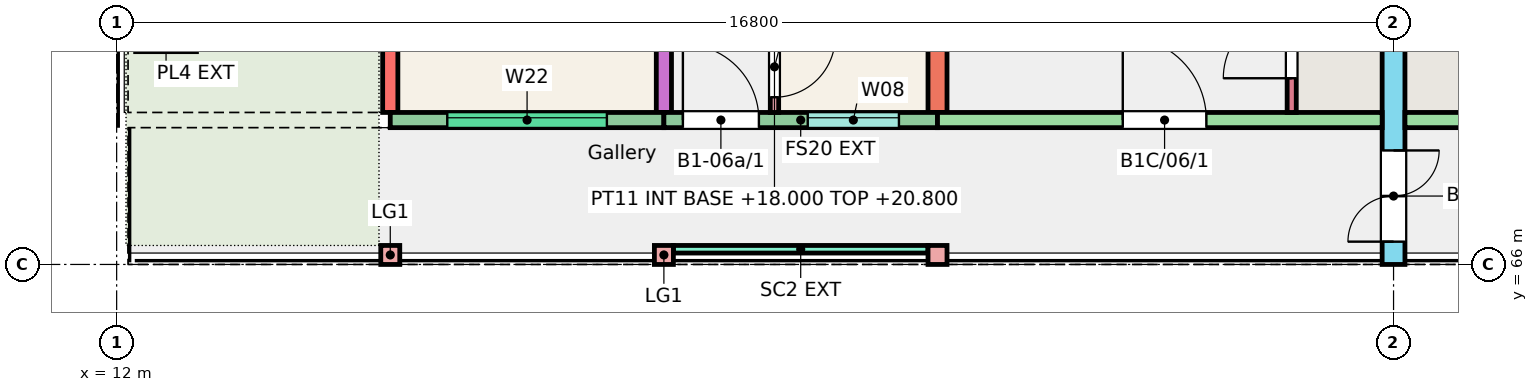
"""IFC4 building model, lengths in metres.
Left out: names, types, materials, properties, quantities, classifications, styles, units other than length and angle.
Written with IfcOpenShell. Run it as: python <this file> out.ifc"""

import sys

from ifc_helpers import new_model, si_unit, direction, frame, frame_2d, origin, origin_2d, place, context, subcontext, project, spatial, rectangle, extrude, element, fill, save


model = new_model("IFC4")
c1 = context("Model", 3, precision=1e-05, world=origin(), true_north=direction((0.0, 1.0)))
c2 = subcontext(c1, "Body", "Model", "MODEL_VIEW")
j1 = project(units=[si_unit("LENGTHUNIT", "METRE"), si_unit("PLANEANGLEUNIT", "RADIAN")], contexts=[c1])
p1 = place(None, origin())
s1 = spatial("IfcSite", under=j1, at=p1, CompositionType="ELEMENT")
p2 = place(p1, origin())
s2 = spatial("IfcBuilding", under=s1, at=p2, CompositionType="ELEMENT")
p3 = place(p2, frame((0.0, 0.0, 18.0)))
s3 = spatial("IfcBuildingStorey", under=s2, at=p3, CompositionType="ELEMENT", Elevation=18.0)
p4 = place(p3, frame((15.6, 68.0, 0.0), z_axis=(0.0, 0.0, 1.0), x_axis=(0.0, 1.0, 0.0)))
e1 = element("IfcWall", 1, at=p4, inside=s3, PredefinedType="SHEAR", context=c2, shape_type="SweptSolid", body=[
    extrude(rectangle(XDim=9.0, YDim=0.2, at=frame_2d((4.5, 0.0))), origin(), (0.0, 0.0, 1.0), 3.0),
])
p5 = place(p4, frame((1.45, 0.0, 0.9)))
e2 = element("IfcOpeningElement", 2, at=p5, cuts=e1, PredefinedType="OPENING", context=c2, shape_type="SweptSolid", body=[
    extrude(rectangle(XDim=1.5, YDim=1.5, at=frame_2d((0.75, 0.75))), frame((0.0, 0.11, 0.0), z_axis=(0.0, -1.0, 0.0), x_axis=(1.0, 0.0, 0.0)), (0.0, 0.0, 1.0), 0.22),
])
p6 = place(p4, frame((7.577, 0.0, 0.9)))
e3 = element("IfcOpeningElement", 3, at=p6, cuts=e1, PredefinedType="OPENING", context=c2, shape_type="SweptSolid", body=[
    extrude(rectangle(XDim=1.2, YDim=1.5, at=frame_2d((0.6, 0.75))), frame((0.0, 0.11, 0.0), z_axis=(0.0, -1.0, 0.0), x_axis=(1.0, 0.0, 0.0)), (0.0, 0.0, 1.0), 0.22),
])
p7 = place(p4, frame((6.255, 0.0, 0.0)))
e4 = element("IfcOpeningElement", 4, at=p7, cuts=e1, PredefinedType="OPENING", context=c2, shape_type="SweptSolid", body=[
    extrude(rectangle(XDim=1.0, YDim=2.1, at=frame_2d((0.5, 1.05))), frame((0.0, 0.11, 0.0), z_axis=(0.0, -1.0, 0.0), x_axis=(1.0, 0.0, 0.0)), (0.0, 0.0, 1.0), 0.22),
])
p8 = place(p3, frame((19.2, 68.0, 0.0), z_axis=(0.0, 0.0, 1.0), x_axis=(0.0, 1.0, 0.0)))
e5 = element("IfcWall", 5, at=p8, inside=s3, PredefinedType="SHEAR", context=c2, shape_type="SweptSolid", body=[
    extrude(rectangle(XDim=9.0, YDim=0.2, at=frame_2d((4.5, 0.0))), origin(), (0.0, 0.0, 1.0), 3.0),
])
p9 = place(p8, frame((2.4, 0.0, 0.0)))
e6 = element("IfcOpeningElement", 6, at=p9, cuts=e5, PredefinedType="OPENING", context=c2, shape_type="SweptSolid", body=[
    extrude(rectangle(XDim=1.2, YDim=2.1, at=frame_2d((0.6, 1.05))), frame((0.0, 0.11, 0.0), z_axis=(0.0, -1.0, 0.0), x_axis=(1.0, 0.0, 0.0)), (0.0, 0.0, 1.0), 0.22),
])
p10 = place(p8, frame((6.4, 0.0, 0.0)))
e7 = element("IfcOpeningElement", 7, at=p10, cuts=e5, PredefinedType="OPENING", context=c2, shape_type="SweptSolid", body=[
    extrude(rectangle(XDim=1.2, YDim=2.1, at=frame_2d((0.6, 1.05))), frame((0.0, 0.11, 0.0), z_axis=(0.0, -1.0, 0.0), x_axis=(1.0, 0.0, 0.0)), (0.0, 0.0, 1.0), 0.22),
])
p11 = place(p3, frame((22.8, 68.0, 0.0), z_axis=(0.0, 0.0, 1.0), x_axis=(0.0, 1.0, 0.0)))
e8 = element("IfcWall", 8, at=p11, inside=s3, PredefinedType="SHEAR", context=c2, shape_type="SweptSolid", body=[
    extrude(rectangle(XDim=9.0, YDim=0.25, at=frame_2d((4.5, 0.0))), origin(), (0.0, 0.0, 1.0), 3.0),
])
p12 = place(p3, frame((28.8, 66.0, 0.0), z_axis=(0.0, 0.0, 1.0), x_axis=(0.0, 1.0, 0.0)))
e9 = element("IfcWall", 9, at=p12, inside=s3, PredefinedType="SHEAR", context=c2, shape_type="SweptSolid", body=[
    extrude(rectangle(XDim=11.0, YDim=0.3, at=frame_2d((5.5, 0.0))), origin(), (0.0, 0.0, 1.0), 3.0),
])
p13 = place(p12, frame((0.3, 0.0, 0.0)))
e10 = element("IfcOpeningElement", 10, at=p13, cuts=e9, PredefinedType="OPENING", context=c2, shape_type="SweptSolid", body=[
    extrude(rectangle(XDim=1.2, YDim=2.1, at=frame_2d((0.6, 1.05))), frame((0.0, 0.16, 0.0), z_axis=(0.0, -1.0, 0.0), x_axis=(1.0, 0.0, 0.0)), (0.0, 0.0, 1.0), 0.32),
])
p14 = place(p3, frame((15.6, 67.9, 0.0), z_axis=(0.0, 0.0, 1.0), x_axis=(1.0, 0.0, 0.0)))
e11 = element("IfcWall", 11, at=p14, inside=s3, PredefinedType="SOLIDWALL", context=c2, shape_type="SweptSolid", body=[
    extrude(rectangle(XDim=3.6, YDim=0.2, at=frame_2d((1.8, 0.0))), origin(), (0.0, 0.0, 1.0), 3.0),
])
p15 = place(p14, frame((0.75, 0.0, 1.2)))
e12 = element("IfcOpeningElement", 12, at=p15, cuts=e11, PredefinedType="OPENING", context=c2, shape_type="SweptSolid", body=[
    extrude(rectangle(XDim=2.1, YDim=1.2, at=frame_2d((1.05, 0.6))), frame((0.0, 0.11, 0.0), z_axis=(0.0, -1.0, 0.0), x_axis=(1.0, 0.0, 0.0)), (0.0, 0.0, 1.0), 0.22),
])
p16 = place(p3, frame((19.2, 67.9, 0.0), z_axis=(0.0, 0.0, 1.0), x_axis=(1.0, 0.0, 0.0)))
e13 = element("IfcWall", 13, at=p16, inside=s3, PredefinedType="SOLIDWALL", context=c2, shape_type="SweptSolid", body=[
    extrude(rectangle(XDim=3.6, YDim=0.2, at=frame_2d((1.8, 0.0))), origin(), (0.0, 0.0, 1.0), 3.0),
])
p17 = place(p16, frame((1.893, 0.0, 1.1)))
e14 = element("IfcOpeningElement", 14, at=p17, cuts=e13, PredefinedType="OPENING", context=c2, shape_type="SweptSolid", body=[
    extrude(rectangle(XDim=1.2, YDim=1.3, at=frame_2d((0.6, 0.65))), frame((0.0, 0.11, 0.0), z_axis=(0.0, -1.0, 0.0), x_axis=(1.0, 0.0, 0.0)), (0.0, 0.0, 1.0), 0.22),
])
p18 = place(p16, frame((0.25, 0.0, 0.0)))
e15 = element("IfcOpeningElement", 15, at=p18, cuts=e13, PredefinedType="OPENING", context=c2, shape_type="SweptSolid", body=[
    extrude(rectangle(XDim=1.0, YDim=2.1, at=frame_2d((0.5, 1.05))), frame((0.0, 0.11, 0.0), z_axis=(0.0, -1.0, 0.0), x_axis=(1.0, 0.0, 0.0)), (0.0, 0.0, 1.0), 0.22),
])
p19 = place(p3, frame((22.8, 67.9, 0.0), z_axis=(0.0, 0.0, 1.0), x_axis=(1.0, 0.0, 0.0)))
e16 = element("IfcWall", 16, at=p19, inside=s3, PredefinedType="SHEAR", context=c2, shape_type="SweptSolid", body=[
    extrude(rectangle(XDim=5.85, YDim=0.2, at=frame_2d((2.925, 0.0))), origin(), (0.0, 0.0, 1.0), 3.0),
])
p20 = place(p19, frame((2.438, 0.0, 0.0)))
e17 = element("IfcOpeningElement", 17, at=p20, cuts=e16, PredefinedType="OPENING", context=c2, shape_type="SweptSolid", body=[
    extrude(rectangle(XDim=1.1, YDim=2.1, at=frame_2d((0.55, 1.05))), frame((0.0, 0.11, 0.0), z_axis=(0.0, -1.0, 0.0), x_axis=(1.0, 0.0, 0.0)), (0.0, 0.0, 1.0), 0.22),
])
p21 = place(p3, frame((27.46, 68.0, 0.0), z_axis=(0.0, 0.0, 1.0), x_axis=(0.0, 1.0, 0.0)))
e18 = element("IfcWall", 18, at=p21, inside=s3, PredefinedType="SHEAR", context=c2, shape_type="SweptSolid", body=[
    extrude(rectangle(XDim=1.72, YDim=0.12, at=frame_2d((0.86, 0.0))), origin(), (0.0, 0.0, 1.0), 3.0),
])
p22 = place(p21, frame((0.45, 0.0, 0.0)))
e19 = element("IfcOpeningElement", 19, at=p22, cuts=e18, PredefinedType="OPENING", context=c2, shape_type="SweptSolid", body=[
    extrude(rectangle(XDim=0.9, YDim=2.1, at=frame_2d((0.45, 1.05))), frame((0.0, 0.07, 0.0), z_axis=(0.0, -1.0, 0.0), x_axis=(1.0, 0.0, 0.0)), (0.0, 0.0, 1.0), 0.14),
])
p23 = place(p3, frame((28.95, 67.9, 0.0), z_axis=(0.0, 0.0, 1.0), x_axis=(1.0, 0.0, 0.0)))
e20 = element("IfcWall", 20, at=p23, inside=s3, PredefinedType="SHEAR", context=c2, shape_type="SweptSolid", body=[
    extrude(rectangle(XDim=5.85, YDim=0.2, at=frame_2d((2.925, 0.0))), origin(), (0.0, 0.0, 1.0), 3.0),
])
p24 = place(p23, frame((2.312, 0.0, 0.0)))
e21 = element("IfcOpeningElement", 21, at=p24, cuts=e20, PredefinedType="OPENING", context=c2, shape_type="SweptSolid", body=[
    extrude(rectangle(XDim=1.1, YDim=2.1, at=frame_2d((0.55, 1.05))), frame((0.0, 0.11, 0.0), z_axis=(0.0, -1.0, 0.0), x_axis=(1.0, 0.0, 0.0)), (0.0, 0.0, 1.0), 0.22),
])
for number, where, z_axis, x_axis in (
    (22, (15.6, 66.125, 0.0), (0.0, 0.0, 1.0), (1.0, 0.0, 0.0)),
    (23, (19.2, 66.125, 0.0), (0.0, 0.0, 1.0), (1.0, 0.0, 0.0)),
    (24, (22.8, 66.125, 0.0), (0.0, 0.0, 1.0), (1.0, 0.0, 0.0)),
):
    element("IfcColumn", number, at=place(p3, frame(where, z_axis=z_axis, x_axis=x_axis)), inside=s3, PredefinedType="COLUMN", context=c2, shape_type="SweptSolid", body=[
        extrude(rectangle(XDim=0.25, YDim=0.25, at=origin_2d()), origin(), (0.0, 0.0, 1.0), 3.0),
    ])
p25 = place(p3, frame((12.25, 68.9, 0.01), z_axis=(0.0, 0.0, 1.0), x_axis=(1.0, 0.0, 0.0)))
e25 = element("IfcWall", 25, at=p25, inside=s3, PredefinedType="SOLIDWALL", context=c2, shape_type="SweptSolid", body=[
    extrude(rectangle(XDim=0.8, YDim=0.2, at=frame_2d((0.4, 0.0))), origin(), (0.0, 0.0, 1.0), 0.45),
])
p26 = place(p3, frame((19.325, 66.2, 0.0), z_axis=(0.0, 0.0, 1.0), x_axis=(1.0, 0.0, 0.0)))
e26 = element("IfcWall", 26, at=p26, inside=s3, PredefinedType="SOLIDWALL", context=c2, shape_type="SweptSolid", body=[
    extrude(rectangle(XDim=3.35, YDim=0.1, at=frame_2d((1.675, 0.0))), origin(), (0.0, 0.0, 1.0), 2.45),
])
p27 = place(p3, frame((20.655, 68.0, 0.0), z_axis=(0.0, 0.0, 1.0), x_axis=(0.0, 1.0, 0.0)))
e27 = element("IfcWall", 27, at=p27, inside=s3, PredefinedType="PARTITIONING", context=c2, shape_type="SweptSolid", body=[
    extrude(rectangle(XDim=4.5, YDim=0.11, at=frame_2d((2.25, 0.0))), origin(), (0.0, 0.0, 1.0), 2.8),
])
p28 = place(p27, frame((0.2, 0.0, 0.0)))
e28 = element("IfcOpeningElement", 28, at=p28, cuts=e27, PredefinedType="OPENING", context=c2, shape_type="SweptSolid", body=[
    extrude(rectangle(XDim=0.8, YDim=2.1, at=frame_2d((0.4, 1.05))), frame((0.0, 0.065, 0.0), z_axis=(0.0, -1.0, 0.0), x_axis=(1.0, 0.0, 0.0)), (0.0, 0.0, 1.0), 0.13),
])
p29 = place(p27, frame((3.55, 0.0, 0.0)))
e29 = element("IfcOpeningElement", 29, at=p29, cuts=e27, PredefinedType="OPENING", context=c2, shape_type="SweptSolid", body=[
    extrude(rectangle(XDim=0.8, YDim=2.1, at=frame_2d((0.4, 1.05))), frame((0.0, 0.065, 0.0), z_axis=(0.0, -1.0, 0.0), x_axis=(1.0, 0.0, 0.0)), (0.0, 0.0, 1.0), 0.13),
])
p30 = place(p15, origin())
e30 = element("IfcWindow", 30, at=p30, inside=s3, PartitioningType="SINGLE_PANEL", PredefinedType="WINDOW", context=c2, shape_type="SweptSolid", body=[
    extrude(rectangle(XDim=2.1, YDim=1.2, at=frame_2d((1.05, 0.6))), frame((0.0, 0.06, 0.0), z_axis=(0.0, -1.0, 0.0), x_axis=(1.0, 0.0, 0.0)), (0.0, 0.0, 1.0), 0.06),
])
fill(e12, e30)
p31 = place(p17, origin())
e31 = element("IfcWindow", 31, at=p31, inside=s3, PartitioningType="SINGLE_PANEL", PredefinedType="WINDOW", context=c2, shape_type="SweptSolid", body=[
    extrude(rectangle(XDim=1.2, YDim=1.3, at=frame_2d((0.6, 0.65))), frame((0.0, 0.06, 0.0), z_axis=(0.0, -1.0, 0.0), x_axis=(1.0, 0.0, 0.0)), (0.0, 0.0, 1.0), 0.06),
])
fill(e14, e31)
p32 = place(p18, origin())
e32 = element("IfcDoor", 32, at=p32, inside=s3, OperationType="SINGLE_SWING_LEFT", PredefinedType="DOOR", context=c2, shape_type="SweptSolid", body=[
    extrude(rectangle(XDim=1.0, YDim=2.1, at=frame_2d((0.5, 1.05))), frame((0.0, 0.025, 0.0), z_axis=(0.0, -1.0, 0.0), x_axis=(1.0, 0.0, 0.0)), (0.0, 0.0, 1.0), 0.05),
])
fill(e15, e32)
p33 = place(p28, origin())
e33 = element("IfcDoor", 33, at=p33, inside=s3, OperationType="SINGLE_SWING_RIGHT", PredefinedType="DOOR", context=c2, shape_type="SweptSolid", body=[
    extrude(rectangle(XDim=0.8, YDim=2.1, at=frame_2d((0.4, 1.05))), frame((0.0, 0.025, 0.0), z_axis=(0.0, -1.0, 0.0), x_axis=(1.0, 0.0, 0.0)), (0.0, 0.0, 1.0), 0.05),
])
fill(e28, e33)
p34 = place(p20, origin())
e34 = element("IfcDoor", 34, at=p34, inside=s3, OperationType="SINGLE_SWING_LEFT", PredefinedType="DOOR", context=c2, shape_type="SweptSolid", body=[
    extrude(rectangle(XDim=1.1, YDim=2.1, at=frame_2d((0.55, 1.05))), frame((0.0, 0.025, 0.0), z_axis=(0.0, -1.0, 0.0), x_axis=(1.0, 0.0, 0.0)), (0.0, 0.0, 1.0), 0.05),
])
fill(e17, e34)
p35 = place(p22, origin())
e35 = element("IfcDoor", 35, at=p35, inside=s3, OperationType="SINGLE_SWING_LEFT", PredefinedType="DOOR", context=c2, shape_type="SweptSolid", body=[
    extrude(rectangle(XDim=0.9, YDim=2.1, at=frame_2d((0.45, 1.05))), frame((0.0, 0.025, 0.0), z_axis=(0.0, -1.0, 0.0), x_axis=(1.0, 0.0, 0.0)), (0.0, 0.0, 1.0), 0.05),
])
fill(e19, e35)
p36 = place(p13, origin())
e36 = element("IfcDoor", 36, at=p36, inside=s3, OperationType="DOUBLE_DOOR_SINGLE_SWING", PredefinedType="DOOR", context=c2, shape_type="SweptSolid", body=[
    extrude(rectangle(XDim=1.2, YDim=2.1, at=frame_2d((0.6, 1.05))), frame((0.0, 0.025, 0.0), z_axis=(0.0, -1.0, 0.0), x_axis=(1.0, 0.0, 0.0)), (0.0, 0.0, 1.0), 0.05),
])
fill(e10, e36)
save(model, sys.argv[1])
